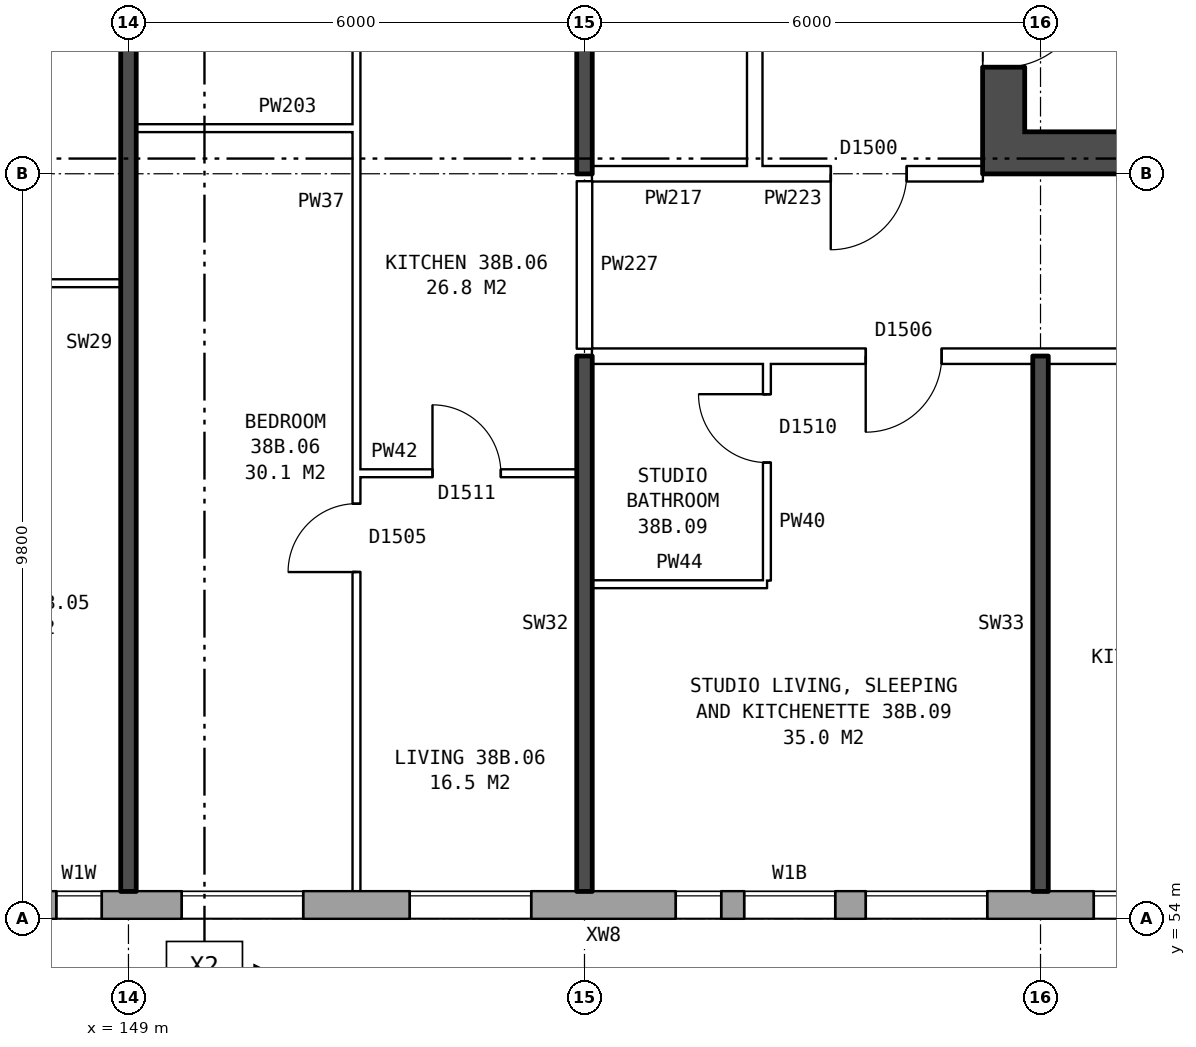
"""IFC4 building model, lengths in metres.
Left out: names, types, materials, properties, quantities, classifications, styles, units other than length and angle.
Written with IfcOpenShell. Run it as: python <this file> out.ifc"""

import sys

from ifc_helpers import new_model, si_unit, direction, frame, frame_2d, origin, place, context, subcontext, project, spatial, rectangle, extrude, element, fill, save


model = new_model("IFC4")
c1 = context("Model", 3, precision=1e-05, world=origin(), true_north=direction((0.0, 1.0)))
c2 = subcontext(c1, "Body", "Model", "MODEL_VIEW")
j1 = project(units=[si_unit("LENGTHUNIT", "METRE"), si_unit("PLANEANGLEUNIT", "RADIAN")], contexts=[c1])
p1 = place(None, origin())
s1 = spatial("IfcSite", under=j1, at=p1, CompositionType="ELEMENT")
p2 = place(p1, origin())
s2 = spatial("IfcBuilding", under=s1, at=p2, CompositionType="ELEMENT")
p3 = place(p2, frame((0.0, 0.0, 136.1)))
s3 = spatial("IfcBuildingStorey", under=s2, at=p3, CompositionType="ELEMENT", Elevation=136.1)
p4 = place(p3, frame((134.075, 54.18, 0.0), z_axis=(0.0, 0.0, 1.0), x_axis=(1.0, 0.0, 0.0)))
e1 = element("IfcWall", 1, at=p4, inside=s3, PredefinedType="STANDARD", context=c2, shape_type="SweptSolid", body=[
    extrude(rectangle(XDim=35.601, YDim=0.36, at=frame_2d((17.8, 0.0))), origin(), (0.0, 0.0, 1.0), 2.85),
])
p5 = place(p4, frame((0.625, 0.0, 0.8)))
e2 = element("IfcOpeningElement", 2, at=p5, cuts=e1, PredefinedType="OPENING", context=c2, shape_type="SweptSolid", body=[
    extrude(rectangle(XDim=1.6, YDim=1.8, at=frame_2d((0.8, 0.9))), frame((0.0, 0.19, 0.0), z_axis=(0.0, -1.0, 0.0), x_axis=(1.0, 0.0, 0.0)), (0.0, 0.0, 1.0), 0.38),
])
p6 = place(p4, frame((3.625, 0.0, 0.8)))
e3 = element("IfcOpeningElement", 3, at=p6, cuts=e1, PredefinedType="OPENING", context=c2, shape_type="SweptSolid", body=[
    extrude(rectangle(XDim=1.6, YDim=1.8, at=frame_2d((0.8, 0.9))), frame((0.0, 0.19, 0.0), z_axis=(0.0, -1.0, 0.0), x_axis=(1.0, 0.0, 0.0)), (0.0, 0.0, 1.0), 0.38),
])
p7 = place(p4, frame((6.625, 0.0, 0.8)))
e4 = element("IfcOpeningElement", 4, at=p7, cuts=e1, PredefinedType="OPENING", context=c2, shape_type="SweptSolid", body=[
    extrude(rectangle(XDim=1.6, YDim=1.8, at=frame_2d((0.8, 0.9))), frame((0.0, 0.19, 0.0), z_axis=(0.0, -1.0, 0.0), x_axis=(1.0, 0.0, 0.0)), (0.0, 0.0, 1.0), 0.38),
])
p8 = place(p4, frame((9.625, 0.0, 0.8)))
e5 = element("IfcOpeningElement", 5, at=p8, cuts=e1, PredefinedType="OPENING", context=c2, shape_type="SweptSolid", body=[
    extrude(rectangle(XDim=1.6, YDim=1.8, at=frame_2d((0.8, 0.9))), frame((0.0, 0.19, 0.0), z_axis=(0.0, -1.0, 0.0), x_axis=(1.0, 0.0, 0.0)), (0.0, 0.0, 1.0), 0.38),
])
p9 = place(p4, frame((12.075, 0.0, 1.05)))
e6 = element("IfcOpeningElement", 6, at=p9, cuts=e1, PredefinedType="OPENING", context=c2, shape_type="SweptSolid", body=[
    extrude(rectangle(XDim=0.8, YDim=1.5, at=frame_2d((0.4, 0.75))), frame((0.0, 0.19, 0.0), z_axis=(0.0, -1.0, 0.0), x_axis=(1.0, 0.0, 0.0)), (0.0, 0.0, 1.0), 0.38),
])
p10 = place(p4, frame((15.625, 0.0, 0.8)))
e7 = element("IfcOpeningElement", 7, at=p10, cuts=e1, PredefinedType="OPENING", context=c2, shape_type="SweptSolid", body=[
    extrude(rectangle(XDim=1.6, YDim=1.8, at=frame_2d((0.8, 0.9))), frame((0.0, 0.19, 0.0), z_axis=(0.0, -1.0, 0.0), x_axis=(1.0, 0.0, 0.0)), (0.0, 0.0, 1.0), 0.38),
])
p11 = place(p4, frame((18.625, 0.0, 0.8)))
e8 = element("IfcOpeningElement", 8, at=p11, cuts=e1, PredefinedType="OPENING", context=c2, shape_type="SweptSolid", body=[
    extrude(rectangle(XDim=1.6, YDim=1.8, at=frame_2d((0.8, 0.9))), frame((0.0, 0.19, 0.0), z_axis=(0.0, -1.0, 0.0), x_axis=(1.0, 0.0, 0.0)), (0.0, 0.0, 1.0), 0.38),
])
p12 = place(p4, frame((22.125, 0.0, 1.7)))
e9 = element("IfcOpeningElement", 9, at=p12, cuts=e1, PredefinedType="OPENING", context=c2, shape_type="SweptSolid", body=[
    extrude(rectangle(XDim=0.6, YDim=0.9, at=frame_2d((0.3, 0.45))), frame((0.0, 0.19, 0.0), z_axis=(0.0, -1.0, 0.0), x_axis=(1.0, 0.0, 0.0)), (0.0, 0.0, 1.0), 0.38),
])
p13 = place(p4, frame((24.625, 0.0, 0.8)))
e10 = element("IfcOpeningElement", 10, at=p13, cuts=e1, PredefinedType="OPENING", context=c2, shape_type="SweptSolid", body=[
    extrude(rectangle(XDim=1.6, YDim=1.8, at=frame_2d((0.8, 0.9))), frame((0.0, 0.19, 0.0), z_axis=(0.0, -1.0, 0.0), x_axis=(1.0, 0.0, 0.0)), (0.0, 0.0, 1.0), 0.38),
])
p14 = place(p4, frame((27.625, 0.0, 0.8)))
e11 = element("IfcOpeningElement", 11, at=p14, cuts=e1, PredefinedType="OPENING", context=c2, shape_type="SweptSolid", body=[
    extrude(rectangle(XDim=1.6, YDim=1.8, at=frame_2d((0.8, 0.9))), frame((0.0, 0.19, 0.0), z_axis=(0.0, -1.0, 0.0), x_axis=(1.0, 0.0, 0.0)), (0.0, 0.0, 1.0), 0.38),
])
p15 = place(p4, frame((30.625, 0.0, 0.8)))
e12 = element("IfcOpeningElement", 12, at=p15, cuts=e1, PredefinedType="OPENING", context=c2, shape_type="SweptSolid", body=[
    extrude(rectangle(XDim=1.6, YDim=1.8, at=frame_2d((0.8, 0.9))), frame((0.0, 0.19, 0.0), z_axis=(0.0, -1.0, 0.0), x_axis=(1.0, 0.0, 0.0)), (0.0, 0.0, 1.0), 0.38),
])
p16 = place(p4, frame((33.625, 0.0, 0.8)))
e13 = element("IfcOpeningElement", 13, at=p16, cuts=e1, PredefinedType="OPENING", context=c2, shape_type="SweptSolid", body=[
    extrude(rectangle(XDim=1.6, YDim=1.8, at=frame_2d((0.8, 0.9))), frame((0.0, 0.19, 0.0), z_axis=(0.0, -1.0, 0.0), x_axis=(1.0, 0.0, 0.0)), (0.0, 0.0, 1.0), 0.38),
])
p17 = place(p4, frame((13.975, 0.0, 0.15)))
e14 = element("IfcOpeningElement", 14, at=p17, cuts=e1, PredefinedType="OPENING", context=c2, shape_type="SweptSolid", body=[
    extrude(rectangle(XDim=0.6, YDim=0.9, at=frame_2d((0.3, 0.45))), frame((0.0, 0.19, 0.0), z_axis=(0.0, -1.0, 0.0), x_axis=(1.0, 0.0, 0.0)), (0.0, 0.0, 1.0), 0.38),
])
p18 = place(p4, frame((23.025, 0.0, 0.8)))
e15 = element("IfcOpeningElement", 15, at=p18, cuts=e1, PredefinedType="OPENING", context=c2, shape_type="SweptSolid", body=[
    extrude(rectangle(XDim=1.2, YDim=1.8, at=frame_2d((0.6, 0.9))), frame((0.0, 0.19, 0.0), z_axis=(0.0, -1.0, 0.0), x_axis=(1.0, 0.0, 0.0)), (0.0, 0.0, 1.0), 0.38),
])
p19 = place(p3, frame((160.515, 76.2, 0.0), z_axis=(0.0, 0.0, 1.0), x_axis=(0.0, -1.0, 0.0)))
e16 = element("IfcWall", 16, at=p19, inside=s3, PredefinedType="SHEAR", context=c2, shape_type="SweptSolid", body=[
    extrude(rectangle(XDim=12.4, YDim=0.55, at=frame_2d((6.2, 0.0))), origin(), (0.0, 0.0, 1.0), 2.85),
])
p20 = place(p19, frame((1.325, 0.0, 0.0)))
e17 = element("IfcOpeningElement", 17, at=p20, cuts=e16, PredefinedType="OPENING", context=c2, shape_type="SweptSolid", body=[
    extrude(rectangle(XDim=1.1, YDim=2.1, at=frame_2d((0.55, 1.05))), frame((0.0, 0.285, 0.0), z_axis=(0.0, -1.0, 0.0), x_axis=(1.0, 0.0, 0.0)), (0.0, 0.0, 1.0), 0.57),
])
p21 = place(p19, frame((4.025, 0.0, 0.0)))
e18 = element("IfcOpeningElement", 18, at=p21, cuts=e16, PredefinedType="OPENING", context=c2, shape_type="SweptSolid", body=[
    extrude(rectangle(XDim=0.85, YDim=2.1, at=frame_2d((0.425, 1.05))), frame((0.0, 0.285, 0.0), z_axis=(0.0, -1.0, 0.0), x_axis=(1.0, 0.0, 0.0)), (0.0, 0.0, 1.0), 0.57),
])
p22 = place(p19, frame((6.175, 0.0, 0.0)))
e19 = element("IfcOpeningElement", 19, at=p22, cuts=e16, PredefinedType="OPENING", context=c2, shape_type="SweptSolid", body=[
    extrude(rectangle(XDim=0.85, YDim=2.1, at=frame_2d((0.425, 1.05))), frame((0.0, 0.285, 0.0), z_axis=(0.0, -1.0, 0.0), x_axis=(1.0, 0.0, 0.0)), (0.0, 0.0, 1.0), 0.57),
])
p23 = place(p19, frame((9.9, 0.0, 0.0)))
e20 = element("IfcOpeningElement", 20, at=p23, cuts=e16, PredefinedType="OPENING", context=c2, shape_type="SweptSolid", body=[
    extrude(rectangle(XDim=1.1, YDim=2.1, at=frame_2d((0.55, 1.05))), frame((0.0, 0.285, 0.0), z_axis=(0.0, -1.0, 0.0), x_axis=(1.0, 0.0, 0.0)), (0.0, 0.0, 1.0), 0.57),
])
p24 = place(p19, frame((8.125, 0.0, 0.0)))
e21 = element("IfcOpeningElement", 21, at=p24, cuts=e16, PredefinedType="OPENING", context=c2, shape_type="SweptSolid", body=[
    extrude(rectangle(XDim=0.85, YDim=2.1, at=frame_2d((0.425, 1.05))), frame((0.0, 0.285, 0.0), z_axis=(0.0, -1.0, 0.0), x_axis=(1.0, 0.0, 0.0)), (0.0, 0.0, 1.0), 0.57),
])
p25 = place(p3, frame((160.79, 64.075, 0.0), z_axis=(0.0, 0.0, 1.0), x_axis=(1.0, 0.0, 0.0)))
e22 = element("IfcWall", 22, at=p25, inside=s3, PredefinedType="SHEAR", context=c2, shape_type="SweptSolid", body=[
    extrude(rectangle(XDim=7.3, YDim=0.55, at=frame_2d((3.65, 0.0))), origin(), (0.0, 0.0, 1.0), 2.85),
])
p26 = place(p3, frame((157.24, 63.9, 0.0), z_axis=(0.0, 0.0, 1.0), x_axis=(0.0, 1.0, 0.0)))
e23 = element("IfcWall", 23, at=p26, inside=s3, PredefinedType="PARTITIONING", context=c2, shape_type="SweptSolid", body=[
    extrude(rectangle(XDim=12.2, YDim=0.2, at=frame_2d((6.1, 0.0))), origin(), (0.0, 0.0, 1.0), 2.85),
])
p27 = place(p26, frame((5.1, 0.0, 0.0)))
e24 = element("IfcOpeningElement", 24, at=p27, cuts=e23, PredefinedType="OPENING", context=c2, shape_type="SweptSolid", body=[
    extrude(rectangle(XDim=2.0, YDim=2.1, at=frame_2d((1.0, 1.05))), frame((0.0, 0.11, 0.0), z_axis=(0.0, -1.0, 0.0), x_axis=(1.0, 0.0, 0.0)), (0.0, 0.0, 1.0), 0.22),
])
p28 = place(p3, frame((155.1, 58.4, 0.0), z_axis=(0.0, 0.0, 1.0), x_axis=(1.0, 0.0, 0.0)))
e25 = element("IfcWall", 25, at=p28, inside=s3, PredefinedType="PARTITIONING", context=c2, shape_type="SweptSolid", body=[
    extrude(rectangle(XDim=2.3, YDim=0.1, at=frame_2d((1.15, 0.0))), origin(), (0.0, 0.0, 1.0), 2.85),
])
p29 = place(p3, frame((152.0, 59.86, 0.0), z_axis=(0.0, 0.0, 1.0), x_axis=(1.0, 0.0, 0.0)))
e26 = element("IfcWall", 26, at=p29, inside=s3, PredefinedType="PARTITIONING", context=c2, shape_type="SweptSolid", body=[
    extrude(rectangle(XDim=2.9, YDim=0.1, at=frame_2d((1.45, 0.0))), origin(), (0.0, 0.0, 1.0), 2.85),
])
p30 = place(p29, frame((1.0, 0.0, 0.0)))
e27 = element("IfcOpeningElement", 27, at=p30, cuts=e26, PredefinedType="OPENING", context=c2, shape_type="SweptSolid", body=[
    extrude(rectangle(XDim=0.9, YDim=2.1, at=frame_2d((0.45, 1.05))), frame((0.0, 0.06, 0.0), z_axis=(0.0, -1.0, 0.0), x_axis=(1.0, 0.0, 0.0)), (0.0, 0.0, 1.0), 0.12),
])
p31 = place(p3, frame((155.1, 61.4, 0.0), z_axis=(0.0, 0.0, 1.0), x_axis=(1.0, 0.0, 0.0)))
e28 = element("IfcWall", 28, at=p31, inside=s3, PredefinedType="PARTITIONING", context=c2, shape_type="SweptSolid", body=[
    extrude(rectangle(XDim=17.29, YDim=0.2, at=frame_2d((8.645, 0.0))), origin(), (0.0, 0.0, 1.0), 2.85),
])
p32 = place(p31, frame((3.6, 0.0, 0.0)))
e29 = element("IfcOpeningElement", 29, at=p32, cuts=e28, PredefinedType="OPENING", context=c2, shape_type="SweptSolid", body=[
    extrude(rectangle(XDim=1.0, YDim=2.1, at=frame_2d((0.5, 1.05))), frame((0.0, 0.11, 0.0), z_axis=(0.0, -1.0, 0.0), x_axis=(1.0, 0.0, 0.0)), (0.0, 0.0, 1.0), 0.22),
])
p33 = place(p31, frame((8.4, 0.0, 0.0)))
e30 = element("IfcOpeningElement", 30, at=p33, cuts=e28, PredefinedType="OPENING", context=c2, shape_type="SweptSolid", body=[
    extrude(rectangle(XDim=1.0, YDim=2.1, at=frame_2d((0.5, 1.05))), frame((0.0, 0.11, 0.0), z_axis=(0.0, -1.0, 0.0), x_axis=(1.0, 0.0, 0.0)), (0.0, 0.0, 1.0), 0.22),
])
p34 = place(p3, frame((146.0, 62.36, 0.0), z_axis=(0.0, 0.0, 1.0), x_axis=(1.0, 0.0, 0.0)))
e31 = element("IfcWall", 31, at=p34, inside=s3, PredefinedType="PARTITIONING", context=c2, shape_type="SweptSolid", body=[
    extrude(rectangle(XDim=2.9, YDim=0.1, at=frame_2d((1.45, 0.0))), origin(), (0.0, 0.0, 1.0), 2.85),
])
p35 = place(p34, frame((1.0, 0.0, 0.0)))
e32 = element("IfcOpeningElement", 32, at=p35, cuts=e31, PredefinedType="OPENING", context=c2, shape_type="SweptSolid", body=[
    extrude(rectangle(XDim=0.9, YDim=2.1, at=frame_2d((0.45, 1.05))), frame((0.0, 0.06, 0.0), z_axis=(0.0, -1.0, 0.0), x_axis=(1.0, 0.0, 0.0)), (0.0, 0.0, 1.0), 0.12),
])
p36 = place(p3, frame((155.1, 63.8, 0.0), z_axis=(0.0, 0.0, 1.0), x_axis=(1.0, 0.0, 0.0)))
e33 = element("IfcWall", 33, at=p36, inside=s3, PredefinedType="PARTITIONING", context=c2, shape_type="SweptSolid", body=[
    extrude(rectangle(XDim=2.14, YDim=0.2, at=frame_2d((1.07, 0.0))), origin(), (0.0, 0.0, 1.0), 2.85),
])
p37 = place(p3, frame((157.24, 63.8, 0.0), z_axis=(0.0, 0.0, 1.0), x_axis=(1.0, 0.0, 0.0)))
e34 = element("IfcWall", 34, at=p37, inside=s3, PredefinedType="PARTITIONING", context=c2, shape_type="SweptSolid", body=[
    extrude(rectangle(XDim=3.0, YDim=0.2, at=frame_2d((1.5, 0.0))), origin(), (0.0, 0.0, 1.0), 2.85),
])
p38 = place(p37, frame((1.0, 0.0, 0.0)))
e35 = element("IfcOpeningElement", 35, at=p38, cuts=e34, PredefinedType="OPENING", context=c2, shape_type="SweptSolid", body=[
    extrude(rectangle(XDim=1.0, YDim=2.1, at=frame_2d((0.5, 1.05))), frame((0.0, 0.11, 0.0), z_axis=(0.0, -1.0, 0.0), x_axis=(1.0, 0.0, 0.0)), (0.0, 0.0, 1.0), 0.22),
])
p39 = place(p3, frame((149.1, 64.4, 0.0), z_axis=(0.0, 0.0, 1.0), x_axis=(1.0, 0.0, 0.0)))
e36 = element("IfcWall", 36, at=p39, inside=s3, PredefinedType="PARTITIONING", context=c2, shape_type="SweptSolid", body=[
    extrude(rectangle(XDim=2.9, YDim=0.1, at=frame_2d((1.45, 0.0))), origin(), (0.0, 0.0, 1.0), 2.85),
])
p40 = place(p3, frame((149.0, 54.36, 0.0), z_axis=(0.0, 0.0, 1.0), x_axis=(0.0, 1.0, 0.0)))
e37 = element("IfcWall", 37, at=p40, inside=s3, PredefinedType="SOLIDWALL", context=c2, shape_type="SweptSolid", body=[
    extrude(rectangle(XDim=14.44, YDim=0.2, at=frame_2d((7.22, 0.0))), origin(), (0.0, 0.0, 1.0), 2.85),
])
p41 = place(p3, frame((152.0, 54.36, 0.0), z_axis=(0.0, 0.0, 1.0), x_axis=(0.0, 1.0, 0.0)))
e38 = element("IfcWall", 38, at=p41, inside=s3, PredefinedType="PARTITIONING", context=c2, shape_type="SweptSolid", body=[
    extrude(rectangle(XDim=14.34, YDim=0.1, at=frame_2d((7.17, 0.0))), origin(), (0.0, 0.0, 1.0), 2.85),
])
p42 = place(p41, frame((4.2, 0.0, 0.0)))
e39 = element("IfcOpeningElement", 39, at=p42, cuts=e38, PredefinedType="OPENING", context=c2, shape_type="SweptSolid", body=[
    extrude(rectangle(XDim=0.9, YDim=2.1, at=frame_2d((0.45, 1.05))), frame((0.0, 0.06, 0.0), z_axis=(0.0, -1.0, 0.0), x_axis=(1.0, 0.0, 0.0)), (0.0, 0.0, 1.0), 0.12),
])
p43 = place(p41, frame((13.04, 0.0, 0.0)))
e40 = element("IfcOpeningElement", 40, at=p43, cuts=e38, PredefinedType="OPENING", context=c2, shape_type="SweptSolid", body=[
    extrude(rectangle(XDim=0.9, YDim=2.1, at=frame_2d((0.45, 1.05))), frame((0.0, 0.06, 0.0), z_axis=(0.0, -1.0, 0.0), x_axis=(1.0, 0.0, 0.0)), (0.0, 0.0, 1.0), 0.12),
])
p44 = place(p3, frame((155.0, 54.36, 0.0), z_axis=(0.0, 0.0, 1.0), x_axis=(0.0, 1.0, 0.0)))
e41 = element("IfcWall", 41, at=p44, inside=s3, PredefinedType="SOLIDWALL", context=c2, shape_type="SweptSolid", body=[
    extrude(rectangle(XDim=7.04, YDim=0.2, at=frame_2d((3.52, 0.0))), origin(), (0.0, 0.0, 1.0), 2.85),
])
p45 = place(p3, frame((155.0, 61.5, 0.0), z_axis=(0.0, 0.0, 1.0), x_axis=(0.0, 1.0, 0.0)))
e42 = element("IfcWall", 42, at=p45, inside=s3, PredefinedType="PARTITIONING", context=c2, shape_type="SweptSolid", body=[
    extrude(rectangle(XDim=2.2, YDim=0.2, at=frame_2d((1.1, 0.0))), origin(), (0.0, 0.0, 1.0), 2.85),
])
p46 = place(p3, frame((155.0, 63.8, 0.0), z_axis=(0.0, 0.0, 1.0), x_axis=(0.0, 1.0, 0.0)))
e43 = element("IfcWall", 43, at=p46, inside=s3, PredefinedType="SOLIDWALL", context=c2, shape_type="SweptSolid", body=[
    extrude(rectangle(XDim=5.0, YDim=0.2, at=frame_2d((2.5, 0.0))), origin(), (0.0, 0.0, 1.0), 2.85),
])
p47 = place(p3, frame((157.4, 58.45, 0.0), z_axis=(0.0, 0.0, 1.0), x_axis=(0.0, 1.0, 0.0)))
e44 = element("IfcWall", 44, at=p47, inside=s3, PredefinedType="PARTITIONING", context=c2, shape_type="SweptSolid", body=[
    extrude(rectangle(XDim=2.85, YDim=0.1, at=frame_2d((1.425, 0.0))), origin(), (0.0, 0.0, 1.0), 2.85),
])
p48 = place(p47, frame((1.55, 0.0, 0.0)))
e45 = element("IfcOpeningElement", 45, at=p48, cuts=e44, PredefinedType="OPENING", context=c2, shape_type="SweptSolid", body=[
    extrude(rectangle(XDim=0.9, YDim=2.1, at=frame_2d((0.45, 1.05))), frame((0.0, 0.06, 0.0), z_axis=(0.0, -1.0, 0.0), x_axis=(1.0, 0.0, 0.0)), (0.0, 0.0, 1.0), 0.12),
])
p49 = place(p3, frame((161.0, 54.36, 0.0), z_axis=(0.0, 0.0, 1.0), x_axis=(0.0, 1.0, 0.0)))
e46 = element("IfcWall", 46, at=p49, inside=s3, PredefinedType="SOLIDWALL", context=c2, shape_type="SweptSolid", body=[
    extrude(rectangle(XDim=7.04, YDim=0.2, at=frame_2d((3.52, 0.0))), origin(), (0.0, 0.0, 1.0), 2.85),
])
p50 = place(p10, origin())
e47 = element("IfcWindow", 47, at=p50, inside=s3, PartitioningType="SINGLE_PANEL", PredefinedType="WINDOW", context=c2, shape_type="SweptSolid", body=[
    extrude(rectangle(XDim=1.6, YDim=1.8, at=frame_2d((0.8, 0.9))), frame((0.0, 0.15, 0.0), z_axis=(0.0, -1.0, 0.0), x_axis=(1.0, 0.0, 0.0)), (0.0, 0.0, 1.0), 0.06),
])
fill(e7, e47)
p51 = place(p11, origin())
e48 = element("IfcWindow", 48, at=p51, inside=s3, PartitioningType="SINGLE_PANEL", PredefinedType="WINDOW", context=c2, shape_type="SweptSolid", body=[
    extrude(rectangle(XDim=1.6, YDim=1.8, at=frame_2d((0.8, 0.9))), frame((0.0, 0.15, 0.0), z_axis=(0.0, -1.0, 0.0), x_axis=(1.0, 0.0, 0.0)), (0.0, 0.0, 1.0), 0.06),
])
fill(e8, e48)
p52 = place(p12, origin())
e49 = element("IfcWindow", 49, at=p52, inside=s3, PartitioningType="SINGLE_PANEL", PredefinedType="WINDOW", context=c2, shape_type="SweptSolid", body=[
    extrude(rectangle(XDim=0.6, YDim=0.9, at=frame_2d((0.3, 0.45))), frame((0.0, 0.15, 0.0), z_axis=(0.0, -1.0, 0.0), x_axis=(1.0, 0.0, 0.0)), (0.0, 0.0, 1.0), 0.06),
])
fill(e9, e49)
p53 = place(p13, origin())
e50 = element("IfcWindow", 50, at=p53, inside=s3, PartitioningType="SINGLE_PANEL", PredefinedType="WINDOW", context=c2, shape_type="SweptSolid", body=[
    extrude(rectangle(XDim=1.6, YDim=1.8, at=frame_2d((0.8, 0.9))), frame((0.0, 0.15, 0.0), z_axis=(0.0, -1.0, 0.0), x_axis=(1.0, 0.0, 0.0)), (0.0, 0.0, 1.0), 0.06),
])
fill(e10, e50)
p54 = place(p14, origin())
e51 = element("IfcWindow", 51, at=p54, inside=s3, PartitioningType="SINGLE_PANEL", PredefinedType="WINDOW", context=c2, shape_type="SweptSolid", body=[
    extrude(rectangle(XDim=1.6, YDim=1.8, at=frame_2d((0.8, 0.9))), frame((0.0, 0.15, 0.0), z_axis=(0.0, -1.0, 0.0), x_axis=(1.0, 0.0, 0.0)), (0.0, 0.0, 1.0), 0.06),
])
fill(e11, e51)
p55 = place(p23, origin())
e52 = element("IfcDoor", 52, at=p55, inside=s3, OperationType="SINGLE_SWING_LEFT", PredefinedType="DOOR", context=c2, shape_type="SweptSolid", body=[
    extrude(rectangle(XDim=1.1, YDim=2.1, at=frame_2d((0.55, 1.05))), frame((0.0, 0.26, 0.0), z_axis=(0.0, -1.0, 0.0), x_axis=(1.0, 0.0, 0.0)), (0.0, 0.0, 1.0), 0.05),
])
fill(e20, e52)
p56 = place(p38, frame((1.0, 0.0, 0.0), z_axis=(0.0, 0.0, 1.0), x_axis=(-1.0, 0.0, 0.0)))
e53 = element("IfcDoor", 53, at=p56, inside=s3, OperationType="SINGLE_SWING_RIGHT", PredefinedType="DOOR", context=c2, shape_type="SweptSolid", body=[
    extrude(rectangle(XDim=1.0, YDim=2.1, at=frame_2d((0.5, 1.05))), frame((0.0, 0.025, 0.0), z_axis=(0.0, -1.0, 0.0), x_axis=(1.0, 0.0, 0.0)), (0.0, 0.0, 1.0), 0.05),
])
fill(e35, e53)
p57 = place(p42, origin())
e54 = element("IfcDoor", 54, at=p57, inside=s3, OperationType="SINGLE_SWING_LEFT", PredefinedType="DOOR", context=c2, shape_type="SweptSolid", body=[
    extrude(rectangle(XDim=0.9, YDim=2.1, at=frame_2d((0.45, 1.05))), frame((0.0, 0.025, 0.0), z_axis=(0.0, -1.0, 0.0), x_axis=(1.0, 0.0, 0.0)), (0.0, 0.0, 1.0), 0.05),
])
fill(e39, e54)
p58 = place(p30, origin())
e55 = element("IfcDoor", 55, at=p58, inside=s3, OperationType="SINGLE_SWING_LEFT", PredefinedType="DOOR", context=c2, shape_type="SweptSolid", body=[
    extrude(rectangle(XDim=0.9, YDim=2.1, at=frame_2d((0.45, 1.05))), frame((0.0, 0.025, 0.0), z_axis=(0.0, -1.0, 0.0), x_axis=(1.0, 0.0, 0.0)), (0.0, 0.0, 1.0), 0.05),
])
fill(e27, e55)
p59 = place(p32, frame((1.0, 0.0, 0.0), z_axis=(0.0, 0.0, 1.0), x_axis=(-1.0, 0.0, 0.0)))
e56 = element("IfcDoor", 56, at=p59, inside=s3, OperationType="SINGLE_SWING_RIGHT", PredefinedType="DOOR", context=c2, shape_type="SweptSolid", body=[
    extrude(rectangle(XDim=1.0, YDim=2.1, at=frame_2d((0.5, 1.05))), frame((0.0, 0.025, 0.0), z_axis=(0.0, -1.0, 0.0), x_axis=(1.0, 0.0, 0.0)), (0.0, 0.0, 1.0), 0.05),
])
fill(e29, e56)
p60 = place(p48, origin())
e57 = element("IfcDoor", 57, at=p60, inside=s3, OperationType="SINGLE_SWING_RIGHT", PredefinedType="DOOR", context=c2, shape_type="SweptSolid", body=[
    extrude(rectangle(XDim=0.9, YDim=2.1, at=frame_2d((0.45, 1.05))), frame((0.0, 0.025, 0.0), z_axis=(0.0, -1.0, 0.0), x_axis=(1.0, 0.0, 0.0)), (0.0, 0.0, 1.0), 0.05),
])
fill(e45, e57)
p61 = place(p17, origin())
e58 = element("IfcWindow", 58, at=p61, inside=s3, PartitioningType="SINGLE_PANEL", PredefinedType="WINDOW", context=c2, shape_type="SweptSolid", body=[
    extrude(rectangle(XDim=0.6, YDim=0.9, at=frame_2d((0.3, 0.45))), frame((0.0, 0.15, 0.0), z_axis=(0.0, -1.0, 0.0), x_axis=(1.0, 0.0, 0.0)), (0.0, 0.0, 1.0), 0.06),
])
fill(e14, e58)
p62 = place(p18, origin())
e59 = element("IfcWindow", 59, at=p62, inside=s3, PartitioningType="SINGLE_PANEL", PredefinedType="WINDOW", context=c2, shape_type="SweptSolid", body=[
    extrude(rectangle(XDim=1.2, YDim=1.8, at=frame_2d((0.6, 0.9))), frame((0.0, 0.15, 0.0), z_axis=(0.0, -1.0, 0.0), x_axis=(1.0, 0.0, 0.0)), (0.0, 0.0, 1.0), 0.06),
])
fill(e15, e59)
save(model, sys.argv[1])
